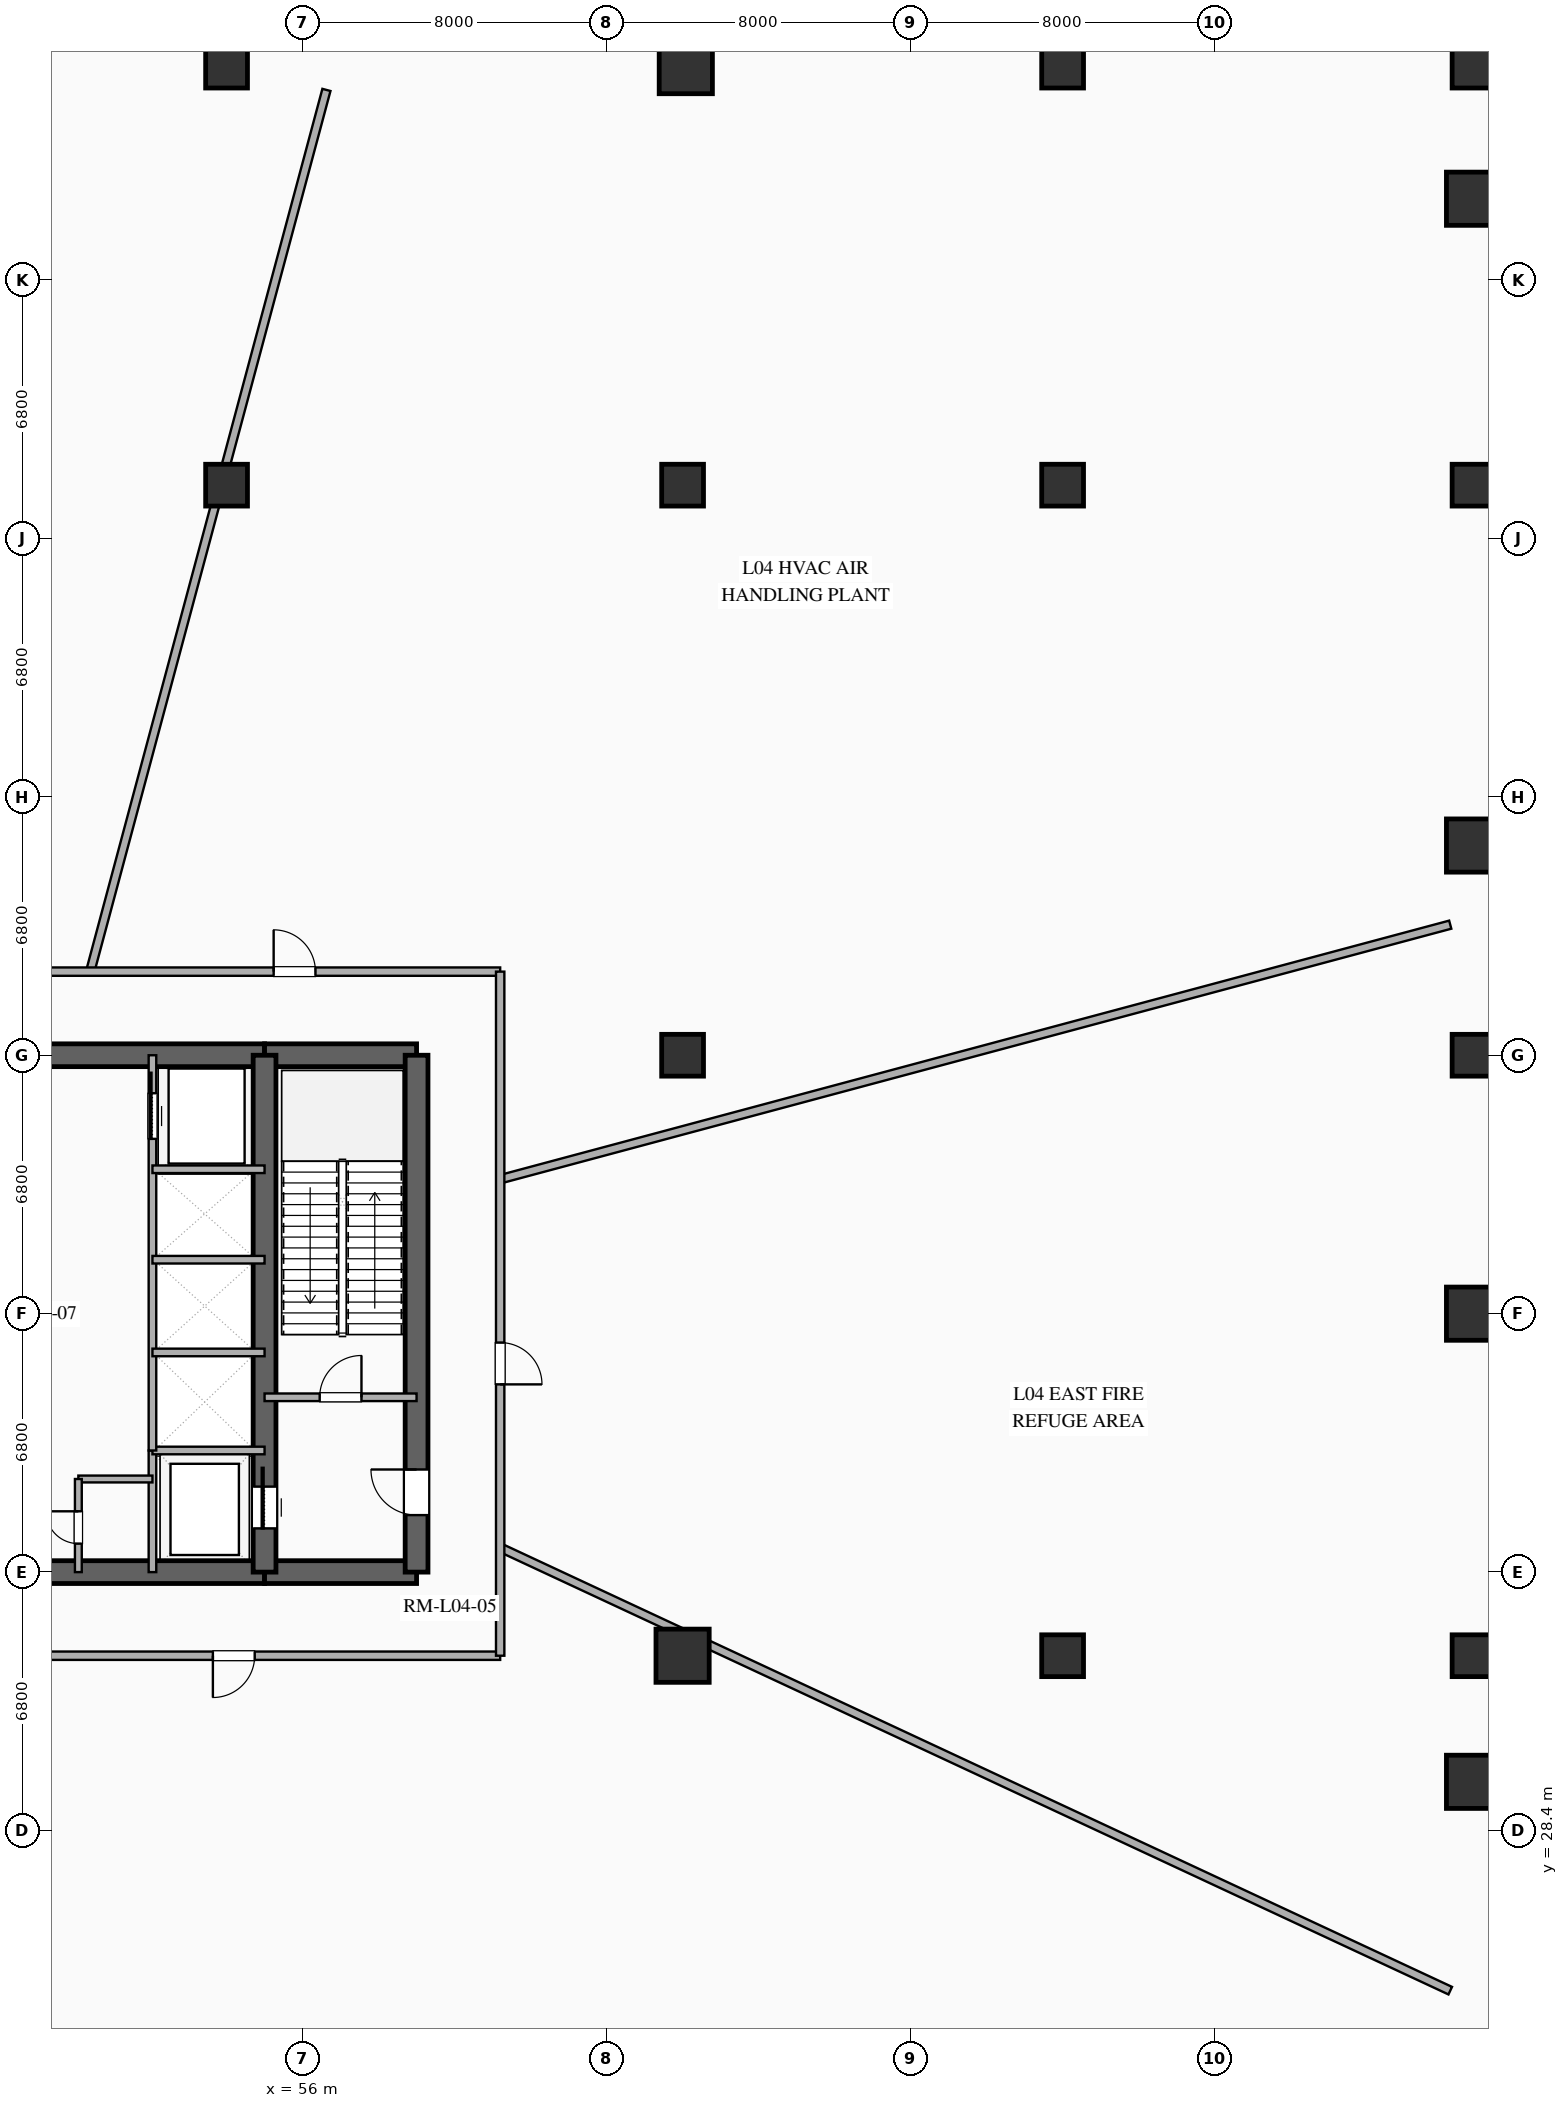
"""IFC4 building model, lengths in metres.
Left out: names, types, materials, properties, quantities, classifications, styles, units other than length and angle.
Written with IfcOpenShell. Run it as: python <this file> out.ifc"""

import sys

from ifc_helpers import new_model, si_unit, direction, frame, frame_2d, origin, origin_2d, place, context, subcontext, project, spatial, rectangle, extrude, element, fill, save


model = new_model("IFC4")
c1 = context("Model", 3, precision=1e-05, world=origin(), true_north=direction((0.0, 1.0)))
c2 = subcontext(c1, "Body", "Model", "MODEL_VIEW")
j1 = project(units=[si_unit("LENGTHUNIT", "METRE"), si_unit("PLANEANGLEUNIT", "RADIAN")], contexts=[c1])
p1 = place(None, origin())
s1 = spatial("IfcSite", under=j1, at=p1, CompositionType="ELEMENT")
p2 = place(p1, origin())
s2 = spatial("IfcBuilding", under=s1, at=p2, CompositionType="ELEMENT")
p3 = place(p2, frame((0.0, 0.0, 22.2)))
s3 = spatial("IfcBuildingStorey", under=s2, at=p3, CompositionType="ELEMENT", Elevation=22.2)
p4 = place(p3, frame((41.0, 35.2, 0.0), z_axis=(0.0, 0.0, 1.0), x_axis=(1.0, 0.0, 0.0)))
e1 = element("IfcWall", 1, at=p4, inside=s3, PredefinedType="SHEAR", context=c2, shape_type="SweptSolid", body=[
    extrude(rectangle(XDim=14.0, YDim=0.6, at=frame_2d((7.0, 0.0))), origin(), (0.0, 0.0, 1.0), 5.75),
])
p5 = place(p4, frame((6.1, 0.0, 0.0)))
e2 = element("IfcOpeningElement", 2, at=p5, cuts=e1, PredefinedType="OPENING", context=c2, shape_type="SweptSolid", body=[
    extrude(rectangle(XDim=1.8, YDim=2.25, at=frame_2d((0.9, 1.125))), frame((0.0, 0.31, 0.0), z_axis=(0.0, -1.0, 0.0), x_axis=(1.0, 0.0, 0.0)), (0.0, 0.0, 1.0), 0.62),
])
p6 = place(p3, frame((55.0, 35.2, 0.0), z_axis=(0.0, 0.0, 1.0), x_axis=(1.0, 0.0, 0.0)))
e3 = element("IfcWall", 3, at=p6, inside=s3, PredefinedType="SHEAR", context=c2, shape_type="SweptSolid", body=[
    extrude(rectangle(XDim=4.0, YDim=0.6, at=frame_2d((2.0, 0.0))), origin(), (0.0, 0.0, 1.0), 5.75),
])
p7 = place(p3, frame((41.0, 48.8, 0.0), z_axis=(0.0, 0.0, 1.0), x_axis=(1.0, 0.0, 0.0)))
e4 = element("IfcWall", 4, at=p7, inside=s3, PredefinedType="SHEAR", context=c2, shape_type="SweptSolid", body=[
    extrude(rectangle(XDim=14.0, YDim=0.6, at=frame_2d((7.0, 0.0))), origin(), (0.0, 0.0, 1.0), 5.75),
])
p8 = place(p7, frame((6.1, 0.0, 0.0)))
e5 = element("IfcOpeningElement", 5, at=p8, cuts=e4, PredefinedType="OPENING", context=c2, shape_type="SweptSolid", body=[
    extrude(rectangle(XDim=1.8, YDim=2.25, at=frame_2d((0.9, 1.125))), frame((0.0, 0.31, 0.0), z_axis=(0.0, -1.0, 0.0), x_axis=(1.0, 0.0, 0.0)), (0.0, 0.0, 1.0), 0.62),
])
p9 = place(p3, frame((55.0, 48.8, 0.0), z_axis=(0.0, 0.0, 1.0), x_axis=(1.0, 0.0, 0.0)))
e6 = element("IfcWall", 6, at=p9, inside=s3, PredefinedType="SHEAR", context=c2, shape_type="SweptSolid", body=[
    extrude(rectangle(XDim=4.0, YDim=0.6, at=frame_2d((2.0, 0.0))), origin(), (0.0, 0.0, 1.0), 5.75),
])
p10 = place(p3, frame((59.0, 35.2, 0.0), z_axis=(0.0, 0.0, 1.0), x_axis=(0.0, 1.0, 0.0)))
e7 = element("IfcWall", 7, at=p10, inside=s3, PredefinedType="SHEAR", context=c2, shape_type="SweptSolid", body=[
    extrude(rectangle(XDim=13.6, YDim=0.6, at=frame_2d((6.8, 0.0))), origin(), (0.0, 0.0, 1.0), 5.75),
])
p11 = place(p10, frame((1.5, 0.0, 0.0)))
e8 = element("IfcOpeningElement", 8, at=p11, cuts=e7, PredefinedType="OPENING", context=c2, shape_type="SweptSolid", body=[
    extrude(rectangle(XDim=1.2, YDim=2.15, at=frame_2d((0.6, 1.075))), frame((0.0, 0.31, 0.0), z_axis=(0.0, -1.0, 0.0), x_axis=(1.0, 0.0, 0.0)), (0.0, 0.0, 1.0), 0.62),
])
p12 = place(p3, frame((55.0, 35.2, 0.0), z_axis=(0.0, 0.0, 1.0), x_axis=(0.0, 1.0, 0.0)))
e9 = element("IfcWall", 9, at=p12, inside=s3, PredefinedType="SHEAR", context=c2, shape_type="SweptSolid", body=[
    extrude(rectangle(XDim=13.6, YDim=0.6, at=frame_2d((6.8, 0.0))), origin(), (0.0, 0.0, 1.0), 5.75),
])
p13 = place(p12, frame((1.15, 0.0, 0.0)))
e10 = element("IfcOpeningElement", 10, at=p13, cuts=e9, PredefinedType="OPENING", context=c2, shape_type="SweptSolid", body=[
    extrude(rectangle(XDim=1.1, YDim=2.2, at=frame_2d((0.55, 1.1))), frame((0.0, 0.31, 0.0), z_axis=(0.0, -1.0, 0.0), x_axis=(1.0, 0.0, 0.0)), (0.0, 0.0, 1.0), 0.62),
])
for number, where, z_axis, x_axis in (
    (11, (54.0, 74.8, 0.0), (0.0, 0.0, 1.0), (1.0, 0.0, 0.0)),
    (12, (54.0, 63.8, 0.0), (0.0, 0.0, 1.0), (1.0, 0.0, 0.0)),
    (13, (66.0, 63.8, 0.0), (0.0, 0.0, 1.0), (1.0, 0.0, 0.0)),
    (14, (76.0, 74.8, 0.0), (0.0, 0.0, 1.0), (1.0, 0.0, 0.0)),
    (15, (76.0, 63.8, 0.0), (0.0, 0.0, 1.0), (1.0, 0.0, 0.0)),
    (16, (86.8, 74.8, 0.0), (0.0, 0.0, 1.0), (1.0, 0.0, 0.0)),
    (17, (86.8, 63.8, 0.0), (0.0, 0.0, 1.0), (1.0, 0.0, 0.0)),
    (18, (86.8, 33.0, 0.0), (0.0, 0.0, 1.0), (1.0, 0.0, 0.0)),
    (19, (86.8, 48.8, 0.0), (0.0, 0.0, 1.0), (1.0, 0.0, 0.0)),
):
    element("IfcColumn", number, at=place(p3, frame(where, z_axis=z_axis, x_axis=x_axis)), inside=s3, PredefinedType="COLUMN", context=c2, shape_type="SweptSolid", body=[
        extrude(rectangle(XDim=1.1, YDim=1.1, at=origin_2d()), origin(), (0.0, 0.0, 1.0), 5.75),
    ])
p14 = place(p3, frame((66.0, 33.0, 0.0), z_axis=(0.0, 0.0, 1.0), x_axis=(1.0, 0.0, 0.0)))
e20 = element("IfcColumn", 20, at=p14, inside=s3, PredefinedType="COLUMN", context=c2, shape_type="SweptSolid", body=[
    extrude(rectangle(XDim=1.4, YDim=1.4, at=origin_2d()), origin(), (0.0, 0.0, 1.0), 5.75),
])
for number, where, z_axis, x_axis in (
    (21, (76.0, 33.0, 0.0), (0.0, 0.0, 1.0), (1.0, 0.0, 0.0)),
    (22, (66.0, 48.8, 0.0), (0.0, 0.0, 1.0), (1.0, 0.0, 0.0)),
):
    element("IfcColumn", number, at=place(p3, frame(where, z_axis=z_axis, x_axis=x_axis)), inside=s3, PredefinedType="COLUMN", context=c2, shape_type="SweptSolid", body=[
        extrude(rectangle(XDim=1.1, YDim=1.1, at=origin_2d()), origin(), (0.0, 0.0, 1.0), 5.75),
    ])
for number, where, z_axis, x_axis in (
    (23, (86.8, 42.0, 0.0), (0.0, 0.0, 1.0), (1.0, 0.0, 0.0)),
    (24, (86.8, 54.318, 0.0), (0.0, 0.0, 1.0), (1.0, 0.0, 0.0)),
    (25, (86.8, 71.337, 0.0), (0.0, 0.0, 1.0), (1.0, 0.0, 0.0)),
    (26, (66.084, 74.8, 0.0), (0.0, 0.0, 1.0), (1.0, 0.0, 0.0)),
    (27, (86.8, 29.682, 0.0), (0.0, 0.0, 1.0), (1.0, 0.0, 0.0)),
):
    element("IfcColumn", number, at=place(p3, frame(where, z_axis=z_axis, x_axis=x_axis)), inside=s3, PredefinedType="COLUMN", context=c2, shape_type="SweptSolid", body=[
        extrude(rectangle(XDim=1.4, YDim=1.4, at=origin_2d()), origin(), (0.0, 0.0, 1.0), 5.75),
    ])
p15 = place(p3, frame((87.85, 74.35, 0.0), z_axis=(0.0, 0.0, 1.0), x_axis=(-0.707106781187, 0.707106781187, 0.0)))
e28 = element("IfcWall", 28, at=p15, inside=s3, PredefinedType="SOLIDWALL", context=c2, shape_type="SweptSolid", body=[
    extrude(rectangle(XDim=2.121, YDim=0.3, at=frame_2d((1.061, 0.0))), origin(), (0.0, 0.0, 1.0), 5.75),
])
p16 = place(p3, frame((55.0, 39.8, 0.0), z_axis=(0.0, 0.0, 1.0), x_axis=(1.0, 0.0, 0.0)))
e29 = element("IfcWall", 29, at=p16, inside=s3, PredefinedType="SOLIDWALL", context=c2, shape_type="SweptSolid", body=[
    extrude(rectangle(XDim=4.0, YDim=0.2, at=frame_2d((2.0, 0.0))), origin(), (0.0, 0.0, 1.0), 2.5),
])
p17 = place(p16, frame((1.45, 0.0, 0.0)))
e30 = element("IfcOpeningElement", 30, at=p17, cuts=e29, PredefinedType="OPENING", context=c2, shape_type="SweptSolid", body=[
    extrude(rectangle(XDim=1.1, YDim=2.15, at=frame_2d((0.55, 1.075))), frame((0.0, 0.11, 0.0), z_axis=(0.0, -1.0, 0.0), x_axis=(1.0, 0.0, 0.0)), (0.0, 0.0, 1.0), 0.22),
])
p18 = place(p3, frame((52.05, 35.2, 0.0), z_axis=(0.0, 0.0, 1.0), x_axis=(0.0, 1.0, 0.0)))
e31 = element("IfcWall", 31, at=p18, inside=s3, PredefinedType="SOLIDWALL", context=c2, shape_type="SweptSolid", body=[
    extrude(rectangle(XDim=3.2, YDim=0.2, at=frame_2d((1.6, 0.0))), origin(), (0.0, 0.0, 1.0), 2.5),
])
p19 = place(p3, frame((52.05, 38.4, 0.0), z_axis=(0.0, 0.0, 1.0), x_axis=(1.0, 0.0, 0.0)))
e32 = element("IfcWall", 32, at=p19, inside=s3, PredefinedType="SOLIDWALL", context=c2, shape_type="SweptSolid", body=[
    extrude(rectangle(XDim=2.95, YDim=0.2, at=frame_2d((1.475, 0.0))), origin(), (0.0, 0.0, 1.0), 2.5),
])
p20 = place(p3, frame((52.05, 38.4, 0.0), z_axis=(0.0, 0.0, 1.0), x_axis=(0.0, 1.0, 0.0)))
e33 = element("IfcWall", 33, at=p20, inside=s3, PredefinedType="SOLIDWALL", context=c2, shape_type="SweptSolid", body=[
    extrude(rectangle(XDim=10.4, YDim=0.2, at=frame_2d((5.2, 0.0))), origin(), (0.0, 0.0, 1.0), 2.5),
])
p21 = place(p20, frame((8.2, 0.0, 0.0)))
e34 = element("IfcOpeningElement", 34, at=p21, cuts=e33, PredefinedType="OPENING", context=c2, shape_type="SweptSolid", body=[
    extrude(rectangle(XDim=1.2, YDim=2.2, at=frame_2d((0.6, 1.1))), frame((0.0, 0.11, 0.0), z_axis=(0.0, -1.0, 0.0), x_axis=(1.0, 0.0, 0.0)), (0.0, 0.0, 1.0), 0.22),
])
for number, where, z_axis, x_axis in (
    (35, (52.05, 40.98, 0.0), (0.0, 0.0, 1.0), (1.0, 0.0, 0.0)),
    (36, (52.05, 43.42, 0.0), (0.0, 0.0, 1.0), (1.0, 0.0, 0.0)),
    (37, (52.05, 45.8, 0.0), (0.0, 0.0, 1.0), (1.0, 0.0, 0.0)),
):
    element("IfcWall", number, at=place(p3, frame(where, z_axis=z_axis, x_axis=x_axis)), inside=s3, PredefinedType="SOLIDWALL", context=c2, shape_type="SweptSolid", body=[
        extrude(rectangle(XDim=2.95, YDim=0.2, at=frame_2d((1.475, 0.0))), origin(), (0.0, 0.0, 1.0), 2.5),
    ])
p22 = place(p3, frame((50.1, 37.65, 0.0), z_axis=(0.0, 0.0, 1.0), x_axis=(1.0, 0.0, 0.0)))
e38 = element("IfcWall", 38, at=p22, inside=s3, PredefinedType="PLUMBINGWALL", context=c2, shape_type="SweptSolid", body=[
    extrude(rectangle(XDim=1.95, YDim=0.18, at=frame_2d((0.975, 0.0))), origin(), (0.0, 0.0, 1.0), 2.5),
])
p23 = place(p3, frame((50.1, 35.2, 0.0), z_axis=(0.0, 0.0, 1.0), x_axis=(0.0, 1.0, 0.0)))
e39 = element("IfcWall", 39, at=p23, inside=s3, PredefinedType="PLUMBINGWALL", context=c2, shape_type="SweptSolid", body=[
    extrude(rectangle(XDim=2.45, YDim=0.18, at=frame_2d((1.225, 0.0))), origin(), (0.0, 0.0, 1.0), 2.5),
])
p24 = place(p23, frame((0.75, 0.0, 0.0)))
e40 = element("IfcOpeningElement", 40, at=p24, cuts=e39, PredefinedType="OPENING", context=c2, shape_type="SweptSolid", body=[
    extrude(rectangle(XDim=0.85, YDim=2.1, at=frame_2d((0.425, 1.05))), frame((0.0, 0.1, 0.0), z_axis=(0.0, -1.0, 0.0), x_axis=(1.0, 0.0, 0.0)), (0.0, 0.0, 1.0), 0.2),
])
p25 = place(p3, frame((61.2, 35.845, 0.0), z_axis=(0.0, 0.0, 1.0), x_axis=(0.906307462258, -0.422618958231, 0.0)))
e41 = element("IfcWall", 41, at=p25, inside=s3, PredefinedType="SOLIDWALL", context=c2, shape_type="SweptSolid", body=[
    extrude(rectangle(XDim=27.584, YDim=0.22, at=frame_2d((13.792, 0.0))), origin(), (0.0, 0.0, 1.0), 2.5),
])
p26 = place(p3, frame((86.2, 52.236, 0.0), z_axis=(0.0, 0.0, 1.0), x_axis=(-0.965925819934, -0.258819068822, 0.0)))
e42 = element("IfcWall", 42, at=p26, inside=s3, PredefinedType="SOLIDWALL", context=c2, shape_type="SweptSolid", body=[
    extrude(rectangle(XDim=25.882, YDim=0.22, at=frame_2d((12.941, 0.0))), origin(), (0.0, 0.0, 1.0), 2.5),
])
p27 = place(p3, frame((50.412, 51.0, 0.0), z_axis=(0.0, 0.0, 1.0), x_axis=(0.25881517655, 0.965926862856, 0.0)))
e43 = element("IfcWall", 43, at=p27, inside=s3, PredefinedType="SOLIDWALL", context=c2, shape_type="SweptSolid", body=[
    extrude(rectangle(XDim=24.018, YDim=0.22, at=frame_2d((12.009, 0.0))), origin(), (0.0, 0.0, 1.0), 2.5),
])
p28 = place(p3, frame((34.8, 51.0, 0.0), z_axis=(0.0, 0.0, 1.0), x_axis=(1.0, 0.0, 0.0)))
e44 = element("IfcWall", 44, at=p28, inside=s3, PredefinedType="SOLIDWALL", context=c2, shape_type="SweptSolid", body=[
    extrude(rectangle(XDim=26.4, YDim=0.22, at=frame_2d((13.2, 0.0))), origin(), (0.0, 0.0, 1.0), 2.5),
])
p29 = place(p28, frame((7.272, 0.0, 0.0)))
e45 = element("IfcOpeningElement", 45, at=p29, cuts=e44, PredefinedType="OPENING", context=c2, shape_type="SweptSolid", body=[
    extrude(rectangle(XDim=1.1, YDim=2.15, at=frame_2d((0.55, 1.075))), frame((0.0, 0.12, 0.0), z_axis=(0.0, -1.0, 0.0), x_axis=(1.0, 0.0, 0.0)), (0.0, 0.0, 1.0), 0.24),
])
p30 = place(p28, frame((20.439, 0.0, 0.0)))
e46 = element("IfcOpeningElement", 46, at=p30, cuts=e44, PredefinedType="OPENING", context=c2, shape_type="SweptSolid", body=[
    extrude(rectangle(XDim=1.1, YDim=2.15, at=frame_2d((0.55, 1.075))), frame((0.0, 0.12, 0.0), z_axis=(0.0, -1.0, 0.0), x_axis=(1.0, 0.0, 0.0)), (0.0, 0.0, 1.0), 0.24),
])
p31 = place(p3, frame((61.2, 33.0, 0.0), z_axis=(0.0, 0.0, 1.0), x_axis=(-1.0, 0.0, 0.0)))
e47 = element("IfcWall", 47, at=p31, inside=s3, PredefinedType="SOLIDWALL", context=c2, shape_type="SweptSolid", body=[
    extrude(rectangle(XDim=26.4, YDim=0.22, at=frame_2d((13.2, 0.0))), origin(), (0.0, 0.0, 1.0), 2.5),
])
p32 = place(p31, frame((6.46, 0.0, 0.0)))
e48 = element("IfcOpeningElement", 48, at=p32, cuts=e47, PredefinedType="OPENING", context=c2, shape_type="SweptSolid", body=[
    extrude(rectangle(XDim=1.1, YDim=2.15, at=frame_2d((0.55, 1.075))), frame((0.0, 0.12, 0.0), z_axis=(0.0, -1.0, 0.0), x_axis=(1.0, 0.0, 0.0)), (0.0, 0.0, 1.0), 0.24),
])
p33 = place(p31, frame((19.628, 0.0, 0.0)))
e49 = element("IfcOpeningElement", 49, at=p33, cuts=e47, PredefinedType="OPENING", context=c2, shape_type="SweptSolid", body=[
    extrude(rectangle(XDim=1.1, YDim=2.15, at=frame_2d((0.55, 1.075))), frame((0.0, 0.12, 0.0), z_axis=(0.0, -1.0, 0.0), x_axis=(1.0, 0.0, 0.0)), (0.0, 0.0, 1.0), 0.24),
])
p34 = place(p3, frame((61.2, 51.0, 0.0), z_axis=(0.0, 0.0, 1.0), x_axis=(0.0, -1.0, 0.0)))
e50 = element("IfcWall", 50, at=p34, inside=s3, PredefinedType="SOLIDWALL", context=c2, shape_type="SweptSolid", body=[
    extrude(rectangle(XDim=18.0, YDim=0.22, at=frame_2d((9.0, 0.0))), origin(), (0.0, 0.0, 1.0), 2.5),
])
p35 = place(p34, frame((9.76, 0.0, 0.0)))
e51 = element("IfcOpeningElement", 51, at=p35, cuts=e50, PredefinedType="OPENING", context=c2, shape_type="SweptSolid", body=[
    extrude(rectangle(XDim=1.1, YDim=2.15, at=frame_2d((0.55, 1.075))), frame((0.0, 0.12, 0.0), z_axis=(0.0, -1.0, 0.0), x_axis=(1.0, 0.0, 0.0)), (0.0, 0.0, 1.0), 0.24),
])
p36 = place(p13, origin())
e52 = element("IfcDoor", 52, at=p36, inside=s3, OperationType="SLIDING_TO_RIGHT", PredefinedType="DOOR", context=c2, shape_type="SweptSolid", body=[
    extrude(rectangle(XDim=1.1, YDim=2.2, at=frame_2d((0.55, 1.1))), frame((0.0, 0.025, 0.0), z_axis=(0.0, -1.0, 0.0), x_axis=(1.0, 0.0, 0.0)), (0.0, 0.0, 1.0), 0.05),
])
fill(e10, e52)
p37 = place(p11, origin())
e53 = element("IfcDoor", 53, at=p37, inside=s3, OperationType="SINGLE_SWING_RIGHT", PredefinedType="DOOR", context=c2, shape_type="SweptSolid", body=[
    extrude(rectangle(XDim=1.2, YDim=2.15, at=frame_2d((0.6, 1.075))), frame((0.0, 0.025, 0.0), z_axis=(0.0, -1.0, 0.0), x_axis=(1.0, 0.0, 0.0)), (0.0, 0.0, 1.0), 0.05),
])
fill(e8, e53)
p38 = place(p17, origin())
e54 = element("IfcDoor", 54, at=p38, inside=s3, OperationType="SINGLE_SWING_RIGHT", PredefinedType="DOOR", context=c2, shape_type="SweptSolid", body=[
    extrude(rectangle(XDim=1.1, YDim=2.15, at=frame_2d((0.55, 1.075))), frame((0.0, 0.025, 0.0), z_axis=(0.0, -1.0, 0.0), x_axis=(1.0, 0.0, 0.0)), (0.0, 0.0, 1.0), 0.05),
])
fill(e30, e54)
p39 = place(p21, origin())
e55 = element("IfcDoor", 55, at=p39, inside=s3, OperationType="SLIDING_TO_RIGHT", PredefinedType="DOOR", context=c2, shape_type="SweptSolid", body=[
    extrude(rectangle(XDim=1.2, YDim=2.2, at=frame_2d((0.6, 1.1))), frame((0.0, 0.025, 0.0), z_axis=(0.0, -1.0, 0.0), x_axis=(1.0, 0.0, 0.0)), (0.0, 0.0, 1.0), 0.05),
])
fill(e34, e55)
p40 = place(p24, origin())
e56 = element("IfcDoor", 56, at=p40, inside=s3, OperationType="SINGLE_SWING_RIGHT", PredefinedType="DOOR", context=c2, shape_type="SweptSolid", body=[
    extrude(rectangle(XDim=0.85, YDim=2.1, at=frame_2d((0.425, 1.05))), frame((0.0, 0.025, 0.0), z_axis=(0.0, -1.0, 0.0), x_axis=(1.0, 0.0, 0.0)), (0.0, 0.0, 1.0), 0.05),
])
fill(e40, e56)
p41 = place(p30, origin())
e57 = element("IfcDoor", 57, at=p41, inside=s3, OperationType="SINGLE_SWING_LEFT", PredefinedType="DOOR", context=c2, shape_type="SweptSolid", body=[
    extrude(rectangle(XDim=1.1, YDim=2.15, at=frame_2d((0.55, 1.075))), frame((0.0, 0.025, 0.0), z_axis=(0.0, -1.0, 0.0), x_axis=(1.0, 0.0, 0.0)), (0.0, 0.0, 1.0), 0.05),
])
fill(e46, e57)
p42 = place(p32, origin())
e58 = element("IfcDoor", 58, at=p42, inside=s3, OperationType="SINGLE_SWING_RIGHT", PredefinedType="DOOR", context=c2, shape_type="SweptSolid", body=[
    extrude(rectangle(XDim=1.1, YDim=2.15, at=frame_2d((0.55, 1.075))), frame((0.0, 0.025, 0.0), z_axis=(0.0, -1.0, 0.0), x_axis=(1.0, 0.0, 0.0)), (0.0, 0.0, 1.0), 0.05),
])
fill(e48, e58)
p43 = place(p35, origin())
e59 = element("IfcDoor", 59, at=p43, inside=s3, OperationType="SINGLE_SWING_RIGHT", PredefinedType="DOOR", context=c2, shape_type="SweptSolid", body=[
    extrude(rectangle(XDim=1.1, YDim=2.15, at=frame_2d((0.55, 1.075))), frame((0.0, 0.025, 0.0), z_axis=(0.0, -1.0, 0.0), x_axis=(1.0, 0.0, 0.0)), (0.0, 0.0, 1.0), 0.05),
])
fill(e51, e59)
save(model, sys.argv[1])
